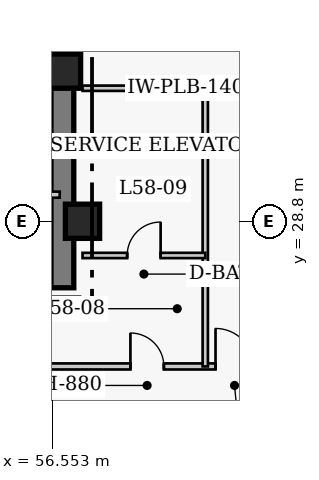
"""IFC4 building model, lengths in metres.
Left out: names, types, materials, properties, quantities, classifications, styles, units other than length and angle.
Written with IfcOpenShell. Run it as: python <this file> out.ifc"""

import sys

from ifc_helpers import new_model, si_unit, direction, frame, frame_2d, origin, origin_2d, place, context, subcontext, project, spatial, rectangle, extrude, element, fill, save


model = new_model("IFC4")
c1 = context("Model", 3, precision=1e-05, world=origin(), true_north=direction((0.0, 1.0)))
c2 = subcontext(c1, "Body", "Model", "MODEL_VIEW")
j1 = project(units=[si_unit("LENGTHUNIT", "METRE"), si_unit("PLANEANGLEUNIT", "RADIAN")], contexts=[c1])
p1 = place(None, origin())
s1 = spatial("IfcSite", under=j1, at=p1, CompositionType="ELEMENT")
p2 = place(p1, origin())
s2 = spatial("IfcBuilding", under=s1, at=p2, CompositionType="ELEMENT")
p3 = place(p2, frame((0.0, 0.0, 231.9)))
s3 = spatial("IfcBuildingStorey", under=s2, at=p3, CompositionType="ELEMENT", Elevation=231.9)
p4 = place(p3, frame((56.82, 27.05, 0.0), z_axis=(0.0, 0.0, 1.0), x_axis=(0.0, 1.0, 0.0)))
e1 = element("IfcWall", 1, at=p4, inside=s3, PredefinedType="SHEAR", context=c2, shape_type="SweptSolid", body=[
    extrude(rectangle(XDim=13.57, YDim=0.6, at=frame_2d((6.785, 0.0))), origin(), (0.0, 0.0, 1.0), 4.6),
])
for number, where, z_axis, x_axis in (
    (2, (57.35, 28.8, 0.0), (0.0, 0.0, 1.0), (1.0, 0.0, 0.0)),
    (3, (56.85, 32.75, 0.0), (0.0, 0.0, 1.0), (1.0, 0.0, 0.0)),
):
    element("IfcColumn", number, at=place(p3, frame(where, z_axis=z_axis, x_axis=x_axis)), inside=s3, PredefinedType="COLUMN", context=c2, shape_type="SweptSolid", body=[
        extrude(rectangle(XDim=0.9, YDim=0.9, at=origin_2d()), origin(), (0.0, 0.0, 1.0), 4.6),
    ])
p5 = place(p3, frame((51.12, 29.5, 0.0), z_axis=(0.0, 0.0, 1.0), x_axis=(1.0, 0.0, 0.0)))
e4 = element("IfcWall", 4, at=p5, inside=s3, PredefinedType="PARTITIONING", context=c2, shape_type="SweptSolid", body=[
    extrude(rectangle(XDim=5.63, YDim=0.16, at=frame_2d((2.815, 0.0))), origin(), (0.0, 0.0, 1.0), 4.35),
])
p6 = place(p3, frame((6.7, 24.98, 0.0), z_axis=(0.0, 0.0, 1.0), x_axis=(1.0, 0.0, 0.0)))
e5 = element("IfcWall", 5, at=p6, inside=s3, PredefinedType="PARTITIONING", context=c2, shape_type="SweptSolid", body=[
    extrude(rectangle(XDim=64.6, YDim=0.16, at=frame_2d((32.3, 0.0))), origin(), (0.0, 0.0, 1.0), 4.35),
])
p7 = place(p6, frame((30.4, 0.0, 0.0)))
e6 = element("IfcOpeningElement", 6, at=p7, cuts=e5, PredefinedType="OPENING", context=c2, shape_type="SweptSolid", body=[
    extrude(rectangle(XDim=1.8, YDim=2.2, at=frame_2d((0.9, 1.1))), frame((0.0, 0.09, 0.0), z_axis=(0.0, -1.0, 0.0), x_axis=(1.0, 0.0, 0.0)), (0.0, 0.0, 1.0), 0.18),
])
p8 = place(p6, frame((21.05, 0.0, 0.0)))
e7 = element("IfcOpeningElement", 7, at=p8, cuts=e5, PredefinedType="OPENING", context=c2, shape_type="SweptSolid", body=[
    extrude(rectangle(XDim=1.0, YDim=2.15, at=frame_2d((0.5, 1.075))), frame((0.0, 0.09, 0.0), z_axis=(0.0, -1.0, 0.0), x_axis=(1.0, 0.0, 0.0)), (0.0, 0.0, 1.0), 0.18),
])
p9 = place(p6, frame((7.05, 0.0, 0.0)))
e8 = element("IfcOpeningElement", 8, at=p9, cuts=e5, PredefinedType="OPENING", context=c2, shape_type="SweptSolid", body=[
    extrude(rectangle(XDim=1.0, YDim=2.15, at=frame_2d((0.5, 1.075))), frame((0.0, 0.09, 0.0), z_axis=(0.0, -1.0, 0.0), x_axis=(1.0, 0.0, 0.0)), (0.0, 0.0, 1.0), 0.18),
])
p10 = place(p6, frame((51.91, 0.0, 0.0)))
e9 = element("IfcOpeningElement", 9, at=p10, cuts=e5, PredefinedType="OPENING", context=c2, shape_type="SweptSolid", body=[
    extrude(rectangle(XDim=0.88, YDim=2.05, at=frame_2d((0.44, 1.025))), frame((0.0, 0.09, 0.0), z_axis=(0.0, -1.0, 0.0), x_axis=(1.0, 0.0, 0.0)), (0.0, 0.0, 1.0), 0.18),
])
p11 = place(p6, frame((54.15, 0.0, 0.0)))
e10 = element("IfcOpeningElement", 10, at=p11, cuts=e5, PredefinedType="OPENING", context=c2, shape_type="SweptSolid", body=[
    extrude(rectangle(XDim=1.0, YDim=2.15, at=frame_2d((0.5, 1.075))), frame((0.0, 0.09, 0.0), z_axis=(0.0, -1.0, 0.0), x_axis=(1.0, 0.0, 0.0)), (0.0, 0.0, 1.0), 0.18),
])
p12 = place(p3, frame((60.58, 24.98, 0.0), z_axis=(0.0, 0.0, 1.0), x_axis=(0.0, 1.0, 0.0)))
e11 = element("IfcWall", 11, at=p12, inside=s3, PredefinedType="PLUMBINGWALL", context=c2, shape_type="SweptSolid", body=[
    extrude(rectangle(XDim=7.32, YDim=0.14, at=frame_2d((3.66, 0.0))), origin(), (0.0, 0.0, 1.0), 4.35),
])
p13 = place(p3, frame((57.35, 27.9, 0.0), z_axis=(0.0, 0.0, 1.0), x_axis=(1.0, 0.0, 0.0)))
e12 = element("IfcWall", 12, at=p13, inside=s3, PredefinedType="PLUMBINGWALL", context=c2, shape_type="SweptSolid", body=[
    extrude(rectangle(XDim=3.23, YDim=0.14, at=frame_2d((1.615, 0.0))), origin(), (0.0, 0.0, 1.0), 4.35),
])
p14 = place(p13, frame((1.175, 0.0, 0.0)))
e13 = element("IfcOpeningElement", 13, at=p14, cuts=e12, PredefinedType="OPENING", context=c2, shape_type="SweptSolid", body=[
    extrude(rectangle(XDim=0.88, YDim=2.05, at=frame_2d((0.44, 1.025))), frame((0.0, 0.08, 0.0), z_axis=(0.0, -1.0, 0.0), x_axis=(1.0, 0.0, 0.0)), (0.0, 0.0, 1.0), 0.16),
])
p15 = place(p3, frame((57.35, 32.3, 0.0), z_axis=(0.0, 0.0, 1.0), x_axis=(1.0, 0.0, 0.0)))
e14 = element("IfcWall", 14, at=p15, inside=s3, PredefinedType="PLUMBINGWALL", context=c2, shape_type="SweptSolid", body=[
    extrude(rectangle(XDim=3.23, YDim=0.14, at=frame_2d((1.615, 0.0))), origin(), (0.0, 0.0, 1.0), 4.35),
])
p16 = place(p10, origin())
e15 = element("IfcDoor", 15, at=p16, inside=s3, OperationType="SINGLE_SWING_LEFT", PredefinedType="DOOR", context=c2, shape_type="SweptSolid", body=[
    extrude(rectangle(XDim=0.88, YDim=2.05, at=frame_2d((0.44, 1.025))), frame((0.0, 0.025, 0.0), z_axis=(0.0, -1.0, 0.0), x_axis=(1.0, 0.0, 0.0)), (0.0, 0.0, 1.0), 0.05),
])
fill(e9, e15)
p17 = place(p14, origin())
e16 = element("IfcDoor", 16, at=p17, inside=s3, OperationType="SINGLE_SWING_RIGHT", PredefinedType="DOOR", context=c2, shape_type="SweptSolid", body=[
    extrude(rectangle(XDim=0.88, YDim=2.05, at=frame_2d((0.44, 1.025))), frame((0.0, 0.025, 0.0), z_axis=(0.0, -1.0, 0.0), x_axis=(1.0, 0.0, 0.0)), (0.0, 0.0, 1.0), 0.05),
])
fill(e13, e16)
p18 = place(p11, origin())
e17 = element("IfcDoor", 17, at=p18, inside=s3, OperationType="SINGLE_SWING_LEFT", PredefinedType="DOOR", context=c2, shape_type="SweptSolid", body=[
    extrude(rectangle(XDim=1.0, YDim=2.15, at=frame_2d((0.5, 1.075))), frame((0.0, 0.025, 0.0), z_axis=(0.0, -1.0, 0.0), x_axis=(1.0, 0.0, 0.0)), (0.0, 0.0, 1.0), 0.05),
])
fill(e10, e17)
save(model, sys.argv[1])
